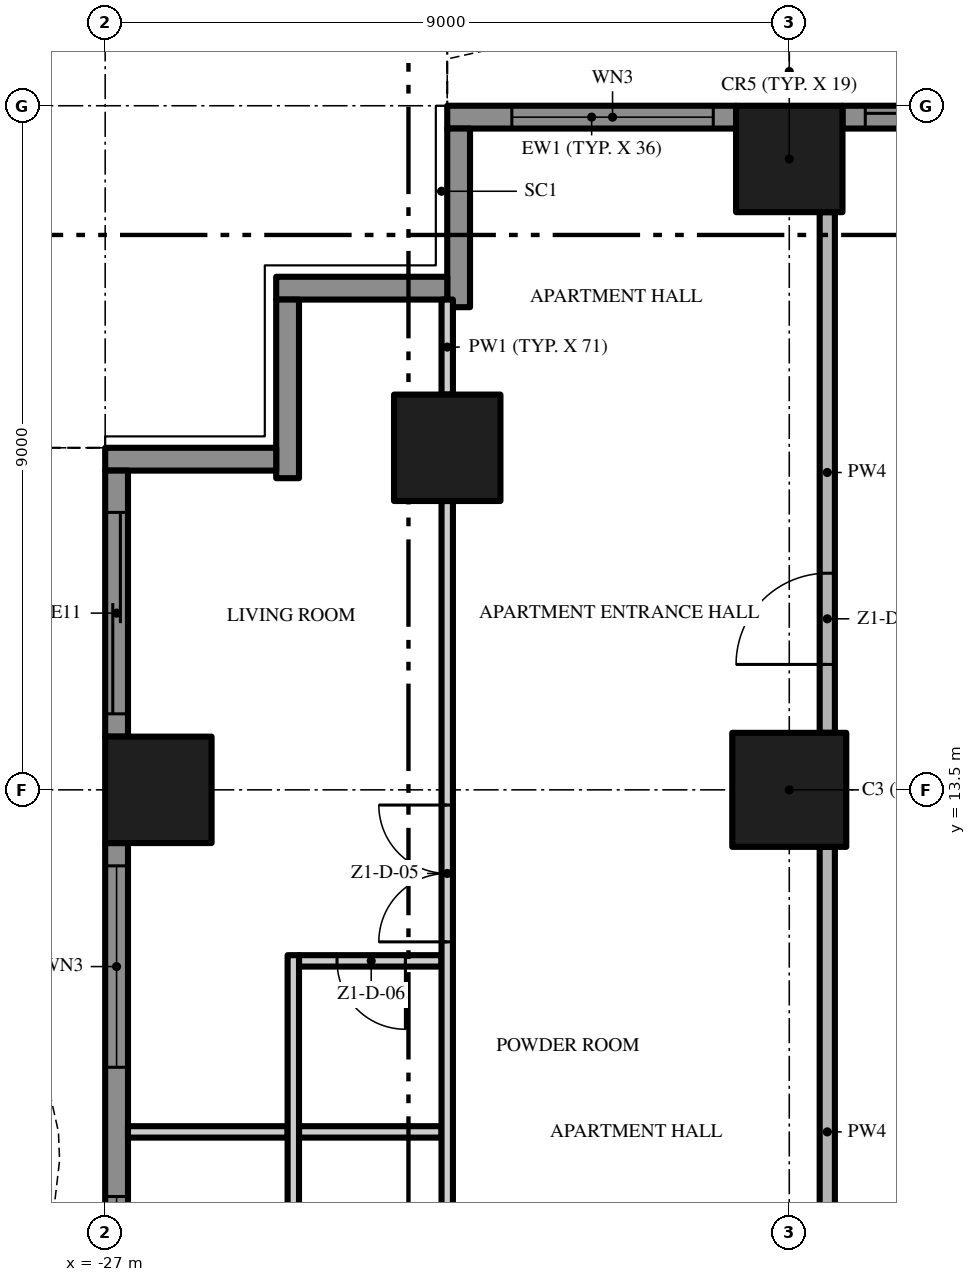
"""IFC4 building model, lengths in metres.
Left out: names, types, materials, properties, quantities, classifications, styles, units other than length and angle.
Written with IfcOpenShell. Run it as: python <this file> out.ifc"""

import sys

from ifc_helpers import new_model, si_unit, direction, frame, frame_2d, origin, origin_2d, place, context, subcontext, project, spatial, polyline, rectangle, outline, extrude, element, fill, save


model = new_model("IFC4")
c1 = context("Model", 3, precision=1e-05, world=origin(), true_north=direction((0.0, 1.0)))
c2 = subcontext(c1, "Body", "Model", "MODEL_VIEW")
j1 = project(units=[si_unit("LENGTHUNIT", "METRE"), si_unit("PLANEANGLEUNIT", "RADIAN")], contexts=[c1])
p1 = place(None, origin())
s1 = spatial("IfcSite", under=j1, at=p1, CompositionType="ELEMENT")
p2 = place(p1, origin())
s2 = spatial("IfcBuilding", under=s1, at=p2, CompositionType="ELEMENT")
p3 = place(p2, frame((0.0, 0.0, 49.2)))
s3 = spatial("IfcBuildingStorey", under=s2, at=p3, CompositionType="ELEMENT", Elevation=49.2)
p4 = place(p3, frame((-18.0, 13.5, 0.0), z_axis=(0.0, 0.0, 1.0), x_axis=(1.0, 0.0, 0.0)))
e1 = element("IfcColumn", 1, at=p4, inside=s3, PredefinedType="COLUMN", context=c2, shape_type="SweptSolid", body=[
    extrude(rectangle(XDim=1.5, YDim=1.5, at=origin_2d()), origin(), (0.0, 0.0, 1.0), 3.5),
])
for number, where, z_axis, x_axis in (
    (2, (-18.0, 21.8, 0.0), (0.0, 0.0, 1.0), (1.0, 0.0, 0.0)),
    (3, (-26.3, 13.5, 0.0), (0.0, 0.0, 1.0), (1.0, 0.0, 0.0)),
    (4, (-22.5, 18.0, 0.0), (0.0, 0.0, 1.0), (1.0, 0.0, 0.0)),
):
    element("IfcColumn", number, at=place(p3, frame(where, z_axis=z_axis, x_axis=x_axis)), inside=s3, PredefinedType="COLUMN", context=c2, shape_type="SweptSolid", body=[
        extrude(rectangle(XDim=1.4, YDim=1.4, at=origin_2d()), origin(), (0.0, 0.0, 1.0), 3.5),
    ])
p5 = place(p3, frame((-17.3, 22.35, 0.0), z_axis=(0.0, 0.0, 1.0), x_axis=(1.0, 0.0, 0.0)))
e5 = element("IfcWall", 5, at=p5, inside=s3, PredefinedType="SOLIDWALL", context=c2, shape_type="SweptSolid", body=[
    extrude(rectangle(XDim=3.8, YDim=0.3, at=frame_2d((1.9, 0.0))), origin(), (0.0, 0.0, 1.0), 3.5),
])
p6 = place(p5, frame((0.3, 0.0, 0.0)))
e6 = element("IfcOpeningElement", 6, at=p6, cuts=e5, PredefinedType="OPENING", context=c2, shape_type="SweptSolid", body=[
    extrude(rectangle(XDim=2.65, YDim=2.4, at=frame_2d((1.325, 1.2))), frame((0.0, 0.16, 0.0), z_axis=(0.0, -1.0, 0.0), x_axis=(1.0, 0.0, 0.0)), (0.0, 0.0, 1.0), 0.32),
])
p7 = place(p3, frame((-22.5, 22.35, 0.0), z_axis=(0.0, 0.0, 1.0), x_axis=(1.0, 0.0, 0.0)))
e7 = element("IfcWall", 7, at=p7, inside=s3, PredefinedType="SOLIDWALL", context=c2, shape_type="SweptSolid", body=[
    extrude(rectangle(XDim=3.8, YDim=0.3, at=frame_2d((1.9, 0.0))), origin(), (0.0, 0.0, 1.0), 3.5),
])
p8 = place(p7, frame((0.85, 0.0, 0.45)))
e8 = element("IfcOpeningElement", 8, at=p8, cuts=e7, PredefinedType="OPENING", context=c2, shape_type="SweptSolid", body=[
    extrude(rectangle(XDim=2.65, YDim=2.65, at=frame_2d((1.325, 1.325))), frame((0.0, 0.16, 0.0), z_axis=(0.0, -1.0, 0.0), x_axis=(1.0, 0.0, 0.0)), (0.0, 0.0, 1.0), 0.32),
])
p9 = place(p3, frame((-22.35, 19.85, 0.0), z_axis=(0.0, 0.0, 1.0), x_axis=(0.0, 1.0, 0.0)))
e9 = element("IfcWall", 9, at=p9, inside=s3, PredefinedType="SOLIDWALL", context=c2, shape_type="SweptSolid", body=[
    extrude(rectangle(XDim=2.35, YDim=0.3, at=frame_2d((1.175, 0.0))), origin(), (0.0, 0.0, 1.0), 3.5),
])
p10 = place(p3, frame((-24.75, 20.1, 0.0), z_axis=(0.0, 0.0, 1.0), x_axis=(1.0, 0.0, 0.0)))
e10 = element("IfcWall", 10, at=p10, inside=s3, PredefinedType="SOLIDWALL", context=c2, shape_type="SweptSolid", body=[
    extrude(rectangle(XDim=2.25, YDim=0.3, at=frame_2d((1.125, 0.0))), origin(), (0.0, 0.0, 1.0), 3.5),
])
p11 = place(p3, frame((-24.6, 17.6, 0.0), z_axis=(0.0, 0.0, 1.0), x_axis=(0.0, 1.0, 0.0)))
e11 = element("IfcWall", 11, at=p11, inside=s3, PredefinedType="SOLIDWALL", context=c2, shape_type="SweptSolid", body=[
    extrude(rectangle(XDim=2.35, YDim=0.3, at=frame_2d((1.175, 0.0))), origin(), (0.0, 0.0, 1.0), 3.5),
])
p12 = place(p3, frame((-27.0, 17.85, 0.0), z_axis=(0.0, 0.0, 1.0), x_axis=(1.0, 0.0, 0.0)))
e12 = element("IfcWall", 12, at=p12, inside=s3, PredefinedType="SOLIDWALL", context=c2, shape_type="SweptSolid", body=[
    extrude(rectangle(XDim=2.25, YDim=0.3, at=frame_2d((1.125, 0.0))), origin(), (0.0, 0.0, 1.0), 3.5),
])
p13 = place(p3, frame((-26.85, 14.2, 0.0), z_axis=(0.0, 0.0, 1.0), x_axis=(0.0, 1.0, 0.0)))
e13 = element("IfcWall", 13, at=p13, inside=s3, PredefinedType="SOLIDWALL", context=c2, shape_type="SweptSolid", body=[
    extrude(rectangle(XDim=3.5, YDim=0.3, at=frame_2d((1.75, 0.0))), origin(), (0.0, 0.0, 1.0), 3.5),
])
p14 = place(p13, frame((0.3, 0.0, 0.0)))
e14 = element("IfcOpeningElement", 14, at=p14, cuts=e13, PredefinedType="OPENING", context=c2, shape_type="SweptSolid", body=[
    extrude(rectangle(XDim=2.65, YDim=2.4, at=frame_2d((1.325, 1.2))), frame((0.0, 0.16, 0.0), z_axis=(0.0, -1.0, 0.0), x_axis=(1.0, 0.0, 0.0)), (0.0, 0.0, 1.0), 0.32),
])
p15 = place(p3, frame((-26.85, 5.2, 0.0), z_axis=(0.0, 0.0, 1.0), x_axis=(0.0, 1.0, 0.0)))
e15 = element("IfcWall", 15, at=p15, inside=s3, PredefinedType="SOLIDWALL", context=c2, shape_type="SweptSolid", body=[
    extrude(rectangle(XDim=7.6, YDim=0.3, at=frame_2d((3.8, 0.0))), origin(), (0.0, 0.0, 1.0), 3.5),
])
p16 = place(p15, frame((4.65, 0.0, 0.45)))
e16 = element("IfcOpeningElement", 16, at=p16, cuts=e15, PredefinedType="OPENING", context=c2, shape_type="SweptSolid", body=[
    extrude(rectangle(XDim=2.65, YDim=2.65, at=frame_2d((1.325, 1.325))), frame((0.0, 0.16, 0.0), z_axis=(0.0, -1.0, 0.0), x_axis=(1.0, 0.0, 0.0)), (0.0, 0.0, 1.0), 0.32),
])
p17 = place(p15, frame((0.3, 0.0, 0.45)))
e17 = element("IfcOpeningElement", 17, at=p17, cuts=e15, PredefinedType="OPENING", context=c2, shape_type="SweptSolid", body=[
    extrude(rectangle(XDim=2.65, YDim=2.65, at=frame_2d((1.325, 1.325))), frame((0.0, 0.16, 0.0), z_axis=(0.0, -1.0, 0.0), x_axis=(1.0, 0.0, 0.0)), (0.0, 0.0, 1.0), 0.32),
])
p18 = place(p3, origin())
e18 = element("IfcWall", 18, at=p18, inside=s3, PredefinedType="USERDEFINED", context=c2, shape_type="SweptSolid", body=[
    extrude(outline(polyline([(-13.5, 25.149), (-15.0, 25.485), (-15.375, 25.5), (-16.5, 25.369), (-18.0, 24.845), (-19.5, 24.112), (-21.0, 23.451), (-22.5, 23.115), (-22.445, 22.871), (-20.921, 23.213), (-19.395, 23.885), (-17.904, 24.614), (-16.444, 25.124), (-15.365, 25.249), (-15.033, 25.236), (-13.555, 24.905), (-13.5, 25.149)])), origin(), (0.0, 0.0, 1.0), 0.9),
])
p19 = place(p3, origin())
e19 = element("IfcWall", 19, at=p19, inside=s3, PredefinedType="USERDEFINED", context=c2, shape_type="SweptSolid", body=[
    extrude(outline(polyline([(-29.649, 18.0), (-29.985, 16.5), (-30.0, 16.125), (-29.869, 15.0), (-29.345, 13.5), (-28.612, 12.0), (-27.951, 10.5), (-27.615, 9.0), (-27.6, 8.625), (-27.731, 7.5), (-28.255, 6.0), (-28.988, 4.5), (-29.649, 3.0), (-29.985, 1.5), (-30.0, 1.125), (-29.869, 0.0), (-29.345, -1.5), (-28.612, -3.0), (-27.951, -4.5), (-27.615, -6.0), (-27.6, -6.375), (-27.731, -7.5), (-28.255, -9.0), (-28.988, -10.5), (-29.649, -12.0), (-29.985, -13.5), (-30.0, -13.875), (-29.869, -15.0), (-29.345, -16.5), (-28.612, -18.0), (-28.388, -17.89), (-29.114, -16.404), (-29.624, -14.944), (-29.749, -13.865), (-29.736, -13.533), (-29.41, -12.079), (-28.761, -10.605), (-28.024, -9.096), (-27.486, -7.556), (-27.349, -6.385), (-27.366, -5.967), (-27.713, -4.421), (-28.385, -2.895), (-29.114, -1.404), (-29.624, 0.056), (-29.749, 1.135), (-29.736, 1.467), (-29.41, 2.921), (-28.761, 4.395), (-28.024, 5.904), (-27.486, 7.444), (-27.349, 8.615), (-27.366, 9.033), (-27.713, 10.579), (-28.385, 12.105), (-29.114, 13.596), (-29.624, 15.056), (-29.749, 16.135), (-29.736, 16.467), (-29.405, 17.945), (-29.649, 18.0)])), origin(), (0.0, 0.0, 1.0), 0.9),
])
p20 = place(p3, frame((-26.7, 9.0, 0.0), z_axis=(0.0, 0.0, 1.0), x_axis=(1.0, 0.0, 0.0)))
e20 = element("IfcWall", 20, at=p20, inside=s3, PredefinedType="PARTITIONING", context=c2, shape_type="SweptSolid", body=[
    extrude(rectangle(XDim=2.1, YDim=0.15, at=frame_2d((1.05, 0.0))), origin(), (0.0, 0.0, 1.0), 3.5),
])
p21 = place(p3, frame((-24.45, 9.0, 0.0), z_axis=(0.0, 0.0, 1.0), x_axis=(1.0, 0.0, 0.0)))
e21 = element("IfcWall", 21, at=p21, inside=s3, PredefinedType="PARTITIONING", context=c2, shape_type="SweptSolid", body=[
    extrude(rectangle(XDim=1.875, YDim=0.15, at=frame_2d((0.938, 0.0))), origin(), (0.0, 0.0, 1.0), 3.5),
])
p22 = place(p3, frame((-22.575, 11.25, 0.0), z_axis=(0.0, 0.0, 1.0), x_axis=(-1.0, 0.0, 0.0)))
e22 = element("IfcWall", 22, at=p22, inside=s3, PredefinedType="PARTITIONING", context=c2, shape_type="SweptSolid", body=[
    extrude(rectangle(XDim=1.875, YDim=0.15, at=frame_2d((0.938, 0.0))), origin(), (0.0, 0.0, 1.0), 3.5),
])
p23 = place(p22, frame((0.475, 0.0, 0.0)))
e23 = element("IfcOpeningElement", 23, at=p23, cuts=e22, PredefinedType="OPENING", context=c2, shape_type="SweptSolid", body=[
    extrude(rectangle(XDim=0.9, YDim=2.1, at=frame_2d((0.45, 1.05))), frame((0.0, 0.085, 0.0), z_axis=(0.0, -1.0, 0.0), x_axis=(1.0, 0.0, 0.0)), (0.0, 0.0, 1.0), 0.17),
])
p24 = place(p3, frame((-24.525, 6.675, 0.0), z_axis=(0.0, 0.0, 1.0), x_axis=(0.0, 1.0, 0.0)))
e24 = element("IfcWall", 24, at=p24, inside=s3, PredefinedType="PARTITIONING", context=c2, shape_type="SweptSolid", body=[
    extrude(rectangle(XDim=4.65, YDim=0.15, at=frame_2d((2.325, 0.0))), origin(), (0.0, 0.0, 1.0), 3.5),
])
p25 = place(p3, frame((-22.5, 0.1, 0.0), z_axis=(0.0, 0.0, 1.0), x_axis=(0.0, 1.0, 0.0)))
e25 = element("IfcWall", 25, at=p25, inside=s3, PredefinedType="PARTITIONING", context=c2, shape_type="SweptSolid", body=[
    extrude(rectangle(XDim=17.2, YDim=0.15, at=frame_2d((8.6, 0.0))), origin(), (0.0, 0.0, 1.0), 3.5),
])
p26 = place(p25, frame((1.65, 0.0, 0.0)))
e26 = element("IfcOpeningElement", 26, at=p26, cuts=e25, PredefinedType="OPENING", context=c2, shape_type="SweptSolid", body=[
    extrude(rectangle(XDim=1.0, YDim=2.4, at=frame_2d((0.5, 1.2))), frame((0.0, 0.085, 0.0), z_axis=(0.0, -1.0, 0.0), x_axis=(1.0, 0.0, 0.0)), (0.0, 0.0, 1.0), 0.17),
])
p27 = place(p25, frame((5.0, 0.0, 0.0)))
e27 = element("IfcOpeningElement", 27, at=p27, cuts=e25, PredefinedType="OPENING", context=c2, shape_type="SweptSolid", body=[
    extrude(rectangle(XDim=1.0, YDim=2.4, at=frame_2d((0.5, 1.2))), frame((0.0, 0.085, 0.0), z_axis=(0.0, -1.0, 0.0), x_axis=(1.0, 0.0, 0.0)), (0.0, 0.0, 1.0), 0.17),
])
p28 = place(p25, frame((11.4, 0.0, 0.0)))
e28 = element("IfcOpeningElement", 28, at=p28, cuts=e25, PredefinedType="OPENING", context=c2, shape_type="SweptSolid", body=[
    extrude(rectangle(XDim=1.8, YDim=2.4, at=frame_2d((0.9, 1.2))), frame((0.0, 0.085, 0.0), z_axis=(0.0, -1.0, 0.0), x_axis=(1.0, 0.0, 0.0)), (0.0, 0.0, 1.0), 0.17),
])
p29 = place(p3, frame((-22.5, 18.7, 0.0), z_axis=(0.0, 0.0, 1.0), x_axis=(0.0, 1.0, 0.0)))
e29 = element("IfcWall", 29, at=p29, inside=s3, PredefinedType="PARTITIONING", context=c2, shape_type="SweptSolid", body=[
    extrude(rectangle(XDim=1.25, YDim=0.15, at=frame_2d((0.625, 0.0))), origin(), (0.0, 0.0, 1.0), 3.5),
])
p30 = place(p3, frame((-17.5, 5.25, 0.0), z_axis=(0.0, 0.0, 1.0), x_axis=(0.0, 1.0, 0.0)))
e30 = element("IfcWall", 30, at=p30, inside=s3, PredefinedType="PARTITIONING", context=c2, shape_type="SweptSolid", body=[
    extrude(rectangle(XDim=7.5, YDim=0.2, at=frame_2d((3.75, 0.0))), origin(), (0.0, 0.0, 1.0), 3.5),
])
p31 = place(p3, frame((-17.5, 14.25, 0.0), z_axis=(0.0, 0.0, 1.0), x_axis=(0.0, 1.0, 0.0)))
e31 = element("IfcWall", 31, at=p31, inside=s3, PredefinedType="PARTITIONING", context=c2, shape_type="SweptSolid", body=[
    extrude(rectangle(XDim=6.85, YDim=0.2, at=frame_2d((3.425, 0.0))), origin(), (0.0, 0.0, 1.0), 3.5),
])
p32 = place(p31, frame((0.9, 0.0, 0.0)))
e32 = element("IfcOpeningElement", 32, at=p32, cuts=e31, PredefinedType="OPENING", context=c2, shape_type="SweptSolid", body=[
    extrude(rectangle(XDim=1.2, YDim=2.4, at=frame_2d((0.6, 1.2))), frame((0.0, 0.11, 0.0), z_axis=(0.0, -1.0, 0.0), x_axis=(1.0, 0.0, 0.0)), (0.0, 0.0, 1.0), 0.22),
])
p33 = place(p6, origin())
e33 = element("IfcDoor", 33, at=p33, inside=s3, OperationType="SINGLE_SWING_LEFT", PredefinedType="DOOR", context=c2, shape_type="SweptSolid", body=[
    extrude(rectangle(XDim=2.65, YDim=2.4, at=frame_2d((1.325, 1.2))), frame((0.0, 0.025, 0.0), z_axis=(0.0, -1.0, 0.0), x_axis=(1.0, 0.0, 0.0)), (0.0, 0.0, 1.0), 0.05),
])
fill(e6, e33)
p34 = place(p8, origin())
e34 = element("IfcWindow", 34, at=p34, inside=s3, PartitioningType="SINGLE_PANEL", PredefinedType="WINDOW", context=c2, shape_type="SweptSolid", body=[
    extrude(rectangle(XDim=2.65, YDim=2.65, at=frame_2d((1.325, 1.325))), frame((0.0, 0.03, 0.0), z_axis=(0.0, -1.0, 0.0), x_axis=(1.0, 0.0, 0.0)), (0.0, 0.0, 1.0), 0.06),
])
fill(e8, e34)
p35 = place(p14, origin())
e35 = element("IfcDoor", 35, at=p35, inside=s3, OperationType="SINGLE_SWING_LEFT", PredefinedType="DOOR", context=c2, shape_type="SweptSolid", body=[
    extrude(rectangle(XDim=2.65, YDim=2.4, at=frame_2d((1.325, 1.2))), frame((0.0, 0.025, 0.0), z_axis=(0.0, -1.0, 0.0), x_axis=(1.0, 0.0, 0.0)), (0.0, 0.0, 1.0), 0.05),
])
fill(e14, e35)
p36 = place(p16, origin())
e36 = element("IfcWindow", 36, at=p36, inside=s3, PartitioningType="SINGLE_PANEL", PredefinedType="WINDOW", context=c2, shape_type="SweptSolid", body=[
    extrude(rectangle(XDim=2.65, YDim=2.65, at=frame_2d((1.325, 1.325))), frame((0.0, 0.03, 0.0), z_axis=(0.0, -1.0, 0.0), x_axis=(1.0, 0.0, 0.0)), (0.0, 0.0, 1.0), 0.06),
])
fill(e16, e36)
p37 = place(p17, origin())
e37 = element("IfcWindow", 37, at=p37, inside=s3, PartitioningType="SINGLE_PANEL", PredefinedType="WINDOW", context=c2, shape_type="SweptSolid", body=[
    extrude(rectangle(XDim=2.65, YDim=2.65, at=frame_2d((1.325, 1.325))), frame((0.0, 0.03, 0.0), z_axis=(0.0, -1.0, 0.0), x_axis=(1.0, 0.0, 0.0)), (0.0, 0.0, 1.0), 0.06),
])
fill(e17, e37)
p38 = place(p32, origin())
e38 = element("IfcDoor", 38, at=p38, inside=s3, OperationType="SINGLE_SWING_LEFT", PredefinedType="DOOR", context=c2, shape_type="SweptSolid", body=[
    extrude(rectangle(XDim=1.2, YDim=2.4, at=frame_2d((0.6, 1.2))), frame((0.0, 0.025, 0.0), z_axis=(0.0, -1.0, 0.0), x_axis=(1.0, 0.0, 0.0)), (0.0, 0.0, 1.0), 0.05),
])
fill(e32, e38)
p39 = place(p28, origin())
e39 = element("IfcDoor", 39, at=p39, inside=s3, OperationType="DOUBLE_DOOR_SINGLE_SWING", PredefinedType="DOOR", context=c2, shape_type="SweptSolid", body=[
    extrude(rectangle(XDim=1.8, YDim=2.4, at=frame_2d((0.9, 1.2))), frame((0.0, 0.025, 0.0), z_axis=(0.0, -1.0, 0.0), x_axis=(1.0, 0.0, 0.0)), (0.0, 0.0, 1.0), 0.05),
])
fill(e28, e39)
p40 = place(p23, origin())
e40 = element("IfcDoor", 40, at=p40, inside=s3, OperationType="SINGLE_SWING_LEFT", PredefinedType="DOOR", context=c2, shape_type="SweptSolid", body=[
    extrude(rectangle(XDim=0.9, YDim=2.1, at=frame_2d((0.45, 1.05))), frame((0.0, 0.025, 0.0), z_axis=(0.0, -1.0, 0.0), x_axis=(1.0, 0.0, 0.0)), (0.0, 0.0, 1.0), 0.05),
])
fill(e23, e40)
save(model, sys.argv[1])
